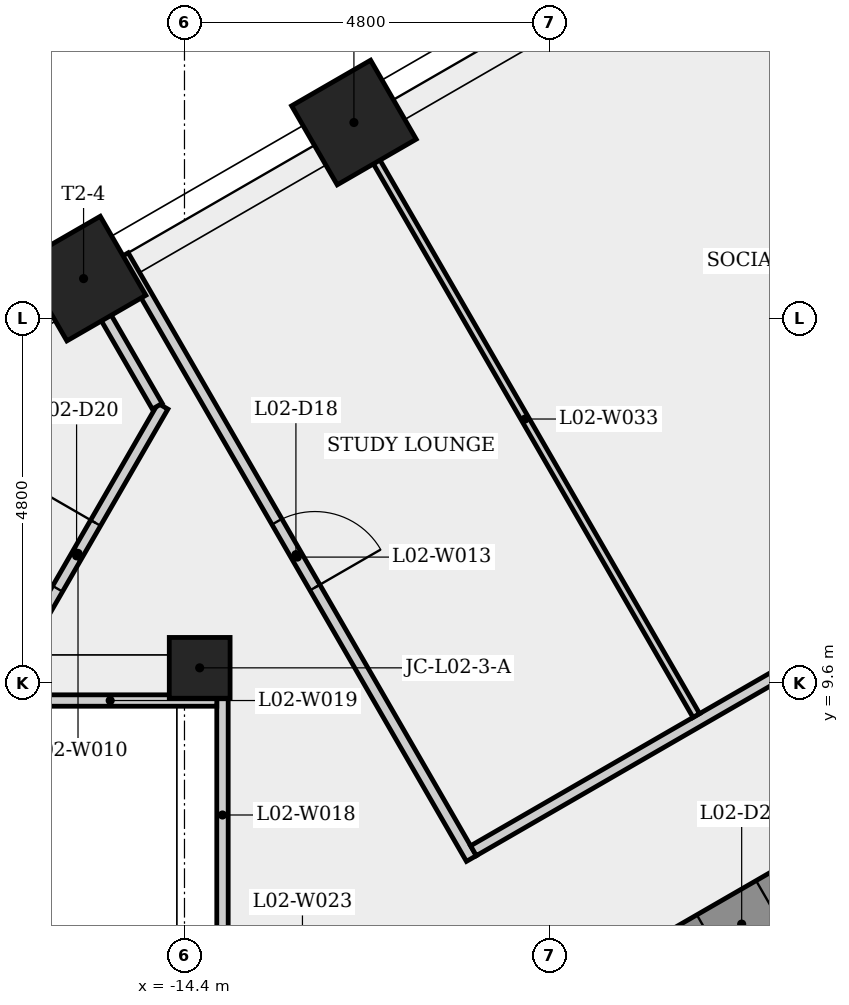
"""IFC4 building model, lengths in metres.
Left out: names, types, materials, properties, quantities, classifications, styles, units other than length and angle.
Written with IfcOpenShell. Run it as: python <this file> out.ifc"""

import sys

from ifc_helpers import new_model, si_unit, direction, frame, frame_2d, origin, origin_2d, place, context, subcontext, project, spatial, rectangle, extrude, element, fill, save


model = new_model("IFC4")
c1 = context("Model", 3, precision=1e-05, world=origin(), true_north=direction((0.0, 1.0)))
c2 = subcontext(c1, "Body", "Model", "MODEL_VIEW")
j1 = project(units=[si_unit("LENGTHUNIT", "METRE"), si_unit("PLANEANGLEUNIT", "RADIAN")], contexts=[c1])
p1 = place(None, origin())
s1 = spatial("IfcSite", under=j1, at=p1, CompositionType="ELEMENT")
p2 = place(p1, origin())
s2 = spatial("IfcBuilding", under=s1, at=p2, CompositionType="ELEMENT")
p3 = place(p2, frame((0.0, 0.0, 11.5)))
s3 = spatial("IfcBuildingStorey", under=s2, at=p3, CompositionType="ELEMENT", Elevation=11.5)
p4 = place(p3, frame((0.2, 10.623, 0.0), z_axis=(0.0, 0.0, 1.0), x_axis=(-0.866023993627, -0.500002442456, 0.0)))
e1 = element("IfcWall", 1, at=p4, inside=s3, PredefinedType="SHEAR", context=c2, shape_type="SweptSolid", body=[
    extrude(rectangle(XDim=10.97, YDim=0.8, at=frame_2d((5.485, 0.0))), origin(), (0.0, 0.0, 1.0), 4.5),
])
p5 = place(p4, frame((7.944, 0.0, 0.0)))
e2 = element("IfcOpeningElement", 2, at=p5, cuts=e1, PredefinedType="OPENING", context=c2, shape_type="SweptSolid", body=[
    extrude(rectangle(XDim=0.9, YDim=2.1, at=frame_2d((0.45, 1.05))), frame((0.0, 0.41, 0.0), z_axis=(0.0, -1.0, 0.0), x_axis=(1.0, 0.0, 0.0)), (0.0, 0.0, 1.0), 0.82),
])
p6 = place(p4, frame((1.86, 0.0, 0.0)))
e3 = element("IfcOpeningElement", 3, at=p6, cuts=e1, PredefinedType="OPENING", context=c2, shape_type="SweptSolid", body=[
    extrude(rectangle(XDim=0.9, YDim=2.1, at=frame_2d((0.45, 1.05))), frame((0.0, 0.41, 0.0), z_axis=(0.0, -1.0, 0.0), x_axis=(1.0, 0.0, 0.0)), (0.0, 0.0, 1.0), 0.82),
])
for number, where, z_axis, x_axis in (
    (4, (-12.171, 16.973, 0.0), (0.0, 0.0, 1.0), (-0.5, 0.866, 0.0)),
    (5, (-15.728, 14.92, 0.0), (0.0, 0.0, 1.0), (-0.5, 0.866, 0.0)),
):
    element("IfcColumn", number, at=place(p3, frame(where, z_axis=z_axis, x_axis=x_axis)), inside=s3, PredefinedType="COLUMN", context=c2, shape_type="SweptSolid", body=[
        extrude(rectangle(XDim=1.2, YDim=1.2, at=origin_2d()), origin(), (0.0, 0.0, 1.0), 4.5),
    ])
p7 = place(p3, frame((-14.2, 9.798, 0.0), z_axis=(0.0, 0.0, 1.0), x_axis=(-1.0, 0.0, 0.0)))
e6 = element("IfcColumn", 6, at=p7, inside=s3, PredefinedType="COLUMN", context=c2, shape_type="SweptSolid", body=[
    extrude(rectangle(XDim=0.8, YDim=0.8, at=origin_2d()), origin(), (0.0, 0.0, 1.0), 4.5),
])
p8 = place(p3, frame((-16.919, 9.368, 0.0), z_axis=(0.0, 0.0, 1.0), x_axis=(0.500009203373, 0.866020090149, 0.0)))
e7 = element("IfcWall", 7, at=p8, inside=s3, PredefinedType="PARTITIONING", context=c2, shape_type="SweptSolid", body=[
    extrude(rectangle(XDim=4.471, YDim=0.15, at=frame_2d((2.236, 0.0))), origin(), (0.0, 0.0, 1.0), 4.1),
])
p9 = place(p8, frame((1.698, 0.0, 0.0)))
e8 = element("IfcOpeningElement", 8, at=p9, cuts=e7, PredefinedType="OPENING", context=c2, shape_type="SweptSolid", body=[
    extrude(rectangle(XDim=1.0, YDim=2.1, at=frame_2d((0.5, 1.05))), frame((0.0, 0.085, 0.0), z_axis=(0.0, -1.0, 0.0), x_axis=(1.0, 0.0, 0.0)), (0.0, 0.0, 1.0), 0.17),
])
p10 = place(p3, frame((-15.205, 15.221, 0.0), z_axis=(0.0, 0.0, 1.0), x_axis=(0.500006245143, -0.86602179812, 0.0)))
e9 = element("IfcWall", 9, at=p10, inside=s3, PredefinedType="PARTITIONING", context=c2, shape_type="SweptSolid", body=[
    extrude(rectangle(XDim=9.16, YDim=0.15, at=frame_2d((4.58, 0.0))), origin(), (0.0, 0.0, 1.0), 4.1),
])
p11 = place(p10, frame((4.042, 0.0, 0.0)))
e10 = element("IfcOpeningElement", 10, at=p11, cuts=e9, PredefinedType="OPENING", context=c2, shape_type="SweptSolid", body=[
    extrude(rectangle(XDim=1.0, YDim=2.1, at=frame_2d((0.5, 1.05))), frame((0.0, 0.085, 0.0), z_axis=(0.0, -1.0, 0.0), x_axis=(1.0, 0.0, 0.0)), (0.0, 0.0, 1.0), 0.17),
])
p12 = place(p3, frame((-14.758, 13.24, 0.0), z_axis=(0.0, 0.0, 1.0), x_axis=(-0.49998396455, 0.866034661658, 0.0)))
e11 = element("IfcWall", 11, at=p12, inside=s3, PredefinedType="PARTITIONING", context=c2, shape_type="SweptSolid", body=[
    extrude(rectangle(XDim=1.939, YDim=0.15, at=frame_2d((0.97, 0.0))), origin(), (0.0, 0.0, 1.0), 4.1),
])
p13 = place(p3, frame((-13.9, 6.281, 0.0), z_axis=(0.0, 0.0, 1.0), x_axis=(0.0, 1.0, 0.0)))
e12 = element("IfcWall", 12, at=p13, inside=s3, PredefinedType="PARTITIONING", context=c2, shape_type="SweptSolid", body=[
    extrude(rectangle(XDim=3.162, YDim=0.15, at=frame_2d((1.581, 0.0))), origin(), (0.0, 0.0, 1.0), 3.175),
])
p14 = place(p3, frame((-13.975, 9.368, 0.0), z_axis=(0.0, 0.0, 1.0), x_axis=(-1.0, 0.0, 0.0)))
e13 = element("IfcWall", 13, at=p14, inside=s3, PredefinedType="PARTITIONING", context=c2, shape_type="SweptSolid", body=[
    extrude(rectangle(XDim=2.805, YDim=0.15, at=frame_2d((1.402, 0.0))), origin(), (0.0, 0.0, 1.0), 3.175),
])
p15 = place(p3, frame((-10.598, 7.391, 0.0), z_axis=(0.0, 0.0, 1.0), x_axis=(0.866022183431, 0.500005577774, 0.0)))
e14 = element("IfcWall", 14, at=p15, inside=s3, PredefinedType="PARTITIONING", context=c2, shape_type="SweptSolid", body=[
    extrude(rectangle(XDim=11.619, YDim=0.15, at=frame_2d((5.81, 0.0))), origin(), (0.0, 0.0, 1.0), 4.1),
])
p16 = place(p15, frame((7.001, 0.0, 0.0)))
e15 = element("IfcOpeningElement", 15, at=p16, cuts=e14, PredefinedType="OPENING", context=c2, shape_type="SweptSolid", body=[
    extrude(rectangle(XDim=1.0, YDim=2.1, at=frame_2d((0.5, 1.05))), frame((0.0, 0.085, 0.0), z_axis=(0.0, -1.0, 0.0), x_axis=(1.0, 0.0, 0.0)), (0.0, 0.0, 1.0), 0.17),
])
p17 = place(p3, frame((-7.666, 9.171, 0.0), z_axis=(0.0, 0.0, 1.0), x_axis=(-0.500009404554, 0.866019973994, 0.0)))
e16 = element("IfcWall", 16, at=p17, inside=s3, PredefinedType="PARTITIONING", context=c2, shape_type="SweptSolid", body=[
    extrude(rectangle(XDim=9.01, YDim=0.1, at=frame_2d((4.505, 0.0))), origin(), (0.0, 0.0, 1.0), 4.1),
])
p18 = place(p11, origin())
e17 = element("IfcDoor", 17, at=p18, inside=s3, OperationType="SINGLE_SWING_RIGHT", PredefinedType="DOOR", context=c2, shape_type="SweptSolid", body=[
    extrude(rectangle(XDim=1.0, YDim=2.1, at=frame_2d((0.5, 1.05))), frame((0.0, 0.025, 0.0), z_axis=(0.0, -1.0, 0.0), x_axis=(1.0, 0.0, 0.0)), (0.0, 0.0, 1.0), 0.05),
])
fill(e10, e17)
p19 = place(p9, origin())
e18 = element("IfcDoor", 18, at=p19, inside=s3, OperationType="SINGLE_SWING_RIGHT", PredefinedType="DOOR", context=c2, shape_type="SweptSolid", body=[
    extrude(rectangle(XDim=1.0, YDim=2.1, at=frame_2d((0.5, 1.05))), frame((0.0, 0.025, 0.0), z_axis=(0.0, -1.0, 0.0), x_axis=(1.0, 0.0, 0.0)), (0.0, 0.0, 1.0), 0.05),
])
fill(e8, e18)
p20 = place(p5, origin())
e19 = element("IfcDoor", 19, at=p20, inside=s3, OperationType="SINGLE_SWING_LEFT", PredefinedType="DOOR", context=c2, shape_type="SweptSolid", body=[
    extrude(rectangle(XDim=0.9, YDim=2.1, at=frame_2d((0.45, 1.05))), frame((0.0, 0.025, 0.0), z_axis=(0.0, -1.0, 0.0), x_axis=(1.0, 0.0, 0.0)), (0.0, 0.0, 1.0), 0.05),
])
fill(e2, e19)
save(model, sys.argv[1])
